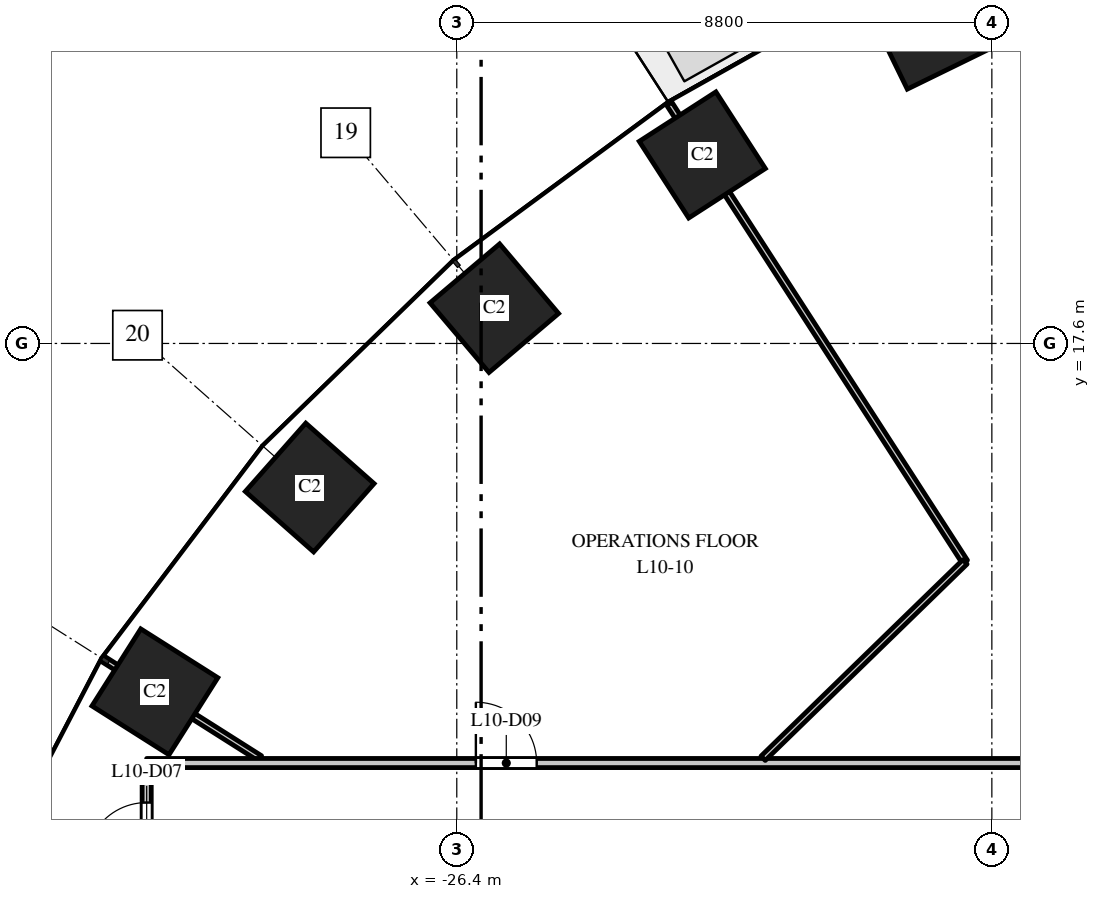
"""IFC4 building model, lengths in metres.
Left out: names, types, materials, properties, quantities, classifications, styles, units other than length and angle.
Written with IfcOpenShell. Run it as: python <this file> out.ifc"""

import sys

from ifc_helpers import new_model, si_unit, direction, frame, frame_2d, origin, origin_2d, place, context, subcontext, project, spatial, rectangle, extrude, element, fill, save


model = new_model("IFC4")
c1 = context("Model", 3, precision=1e-05, world=origin(), true_north=direction((0.0, 1.0)))
c2 = subcontext(c1, "Body", "Model", "MODEL_VIEW")
j1 = project(units=[si_unit("LENGTHUNIT", "METRE"), si_unit("PLANEANGLEUNIT", "RADIAN")], contexts=[c1])
p1 = place(None, origin())
s1 = spatial("IfcSite", under=j1, at=p1, CompositionType="ELEMENT")
p2 = place(p1, origin())
s2 = spatial("IfcBuilding", under=s1, at=p2, CompositionType="ELEMENT")
p3 = place(p2, frame((0.0, 0.0, 50.5)))
s3 = spatial("IfcBuildingStorey", under=s2, at=p3, CompositionType="ELEMENT", Elevation=50.5)
for number, where, z_axis, x_axis in (
    (1, (-18.646, 22.785, 0.0), (0.0, 0.0, 1.0), (-0.898, -0.439, 0.0)),
    (2, (-22.362, 20.7, 0.0), (0.0, 0.0, 1.0), (-0.84, -0.542, 0.0)),
    (3, (-25.783, 18.18, 0.0), (0.0, 0.0, 1.0), (-0.763, -0.646, 0.0)),
    (4, (-28.819, 15.23, 0.0), (0.0, 0.0, 1.0), (-0.663, -0.749, 0.0)),
    (5, (-31.365, 11.871, 0.0), (0.0, 0.0, 1.0), (-0.535, -0.845, 0.0)),
):
    element("IfcColumn", number, at=place(p3, frame(where, z_axis=z_axis, x_axis=x_axis)), inside=s3, PredefinedType="COLUMN", context=c2, shape_type="SweptSolid", body=[
        extrude(rectangle(XDim=1.5, YDim=1.5, at=origin_2d()), origin(), (0.0, 0.0, 1.0), 4.0),
    ])
p4 = place(p3, frame((-32.212, 12.408, 0.0), z_axis=(0.0, 0.0, 1.0), x_axis=(0.844810627195, -0.535065420467, 0.0)))
e6 = element("IfcWall", 6, at=p4, inside=s3, PredefinedType="PARTITIONING", context=c2, shape_type="SweptSolid", body=[
    extrude(rectangle(XDim=3.048, YDim=0.1, at=frame_2d((1.524, 0.0))), origin(), (0.0, 0.0, 1.0), 3.7),
])
p5 = place(p3, frame((-31.5, 8.5, 0.0), z_axis=(0.0, 0.0, 1.0), x_axis=(0.0, 1.0, 0.0)))
e7 = element("IfcWall", 7, at=p5, inside=s3, PredefinedType="PARTITIONING", context=c2, shape_type="SweptSolid", body=[
    extrude(rectangle(XDim=2.2, YDim=0.15, at=frame_2d((1.1, 0.0))), origin(), (0.0, 0.0, 1.0), 3.7),
])
p6 = place(p5, frame((0.55, 0.0, 0.0)))
e8 = element("IfcOpeningElement", 8, at=p6, cuts=e7, PredefinedType="OPENING", context=c2, shape_type="SweptSolid", body=[
    extrude(rectangle(XDim=1.0, YDim=2.1, at=frame_2d((0.5, 1.05))), frame((0.0, 0.085, 0.0), z_axis=(0.0, -1.0, 0.0), x_axis=(1.0, 0.0, 0.0)), (0.0, 0.0, 1.0), 0.17),
])
p7 = place(p3, frame((-31.5, 10.7, 0.0), z_axis=(0.0, 0.0, 1.0), x_axis=(1.0, 0.0, 0.0)))
e9 = element("IfcWall", 9, at=p7, inside=s3, PredefinedType="PARTITIONING", context=c2, shape_type="SweptSolid", body=[
    extrude(rectangle(XDim=15.0, YDim=0.15, at=frame_2d((7.5, 0.0))), origin(), (0.0, 0.0, 1.0), 3.1),
])
p8 = place(p7, frame((5.414, 0.0, 0.0)))
e10 = element("IfcOpeningElement", 10, at=p8, cuts=e9, PredefinedType="OPENING", context=c2, shape_type="SweptSolid", body=[
    extrude(rectangle(XDim=1.0, YDim=2.1, at=frame_2d((0.5, 1.05))), frame((0.0, 0.085, 0.0), z_axis=(0.0, -1.0, 0.0), x_axis=(1.0, 0.0, 0.0)), (0.0, 0.0, 1.0), 0.17),
])
p9 = place(p3, frame((-22.905, 21.542, 0.0), z_axis=(0.0, 0.0, 1.0), x_axis=(0.542241597628, -0.840222619192, 0.0)))
e11 = element("IfcWall", 11, at=p9, inside=s3, PredefinedType="PARTITIONING", context=c2, shape_type="SweptSolid", body=[
    extrude(rectangle(XDim=8.967, YDim=0.1, at=frame_2d((4.483, 0.0))), origin(), (0.0, 0.0, 1.0), 2.85),
])
p10 = place(p3, frame((-21.362, 10.778, 0.0), z_axis=(0.0, 0.0, 1.0), x_axis=(0.716869759063, 0.697207105917, 0.0)))
e12 = element("IfcWall", 12, at=p10, inside=s3, PredefinedType="PARTITIONING", context=c2, shape_type="SweptSolid", body=[
    extrude(rectangle(XDim=4.631, YDim=0.1, at=frame_2d((2.316, 0.0))), origin(), (0.0, 0.0, 1.0), 2.75),
])
p11 = place(p6, origin())
e13 = element("IfcDoor", 13, at=p11, inside=s3, OperationType="SINGLE_SWING_LEFT", PredefinedType="DOOR", context=c2, shape_type="SweptSolid", body=[
    extrude(rectangle(XDim=1.0, YDim=2.1, at=frame_2d((0.5, 1.05))), frame((0.0, 0.025, 0.0), z_axis=(0.0, -1.0, 0.0), x_axis=(1.0, 0.0, 0.0)), (0.0, 0.0, 1.0), 0.05),
])
fill(e8, e13)
p12 = place(p8, origin())
e14 = element("IfcDoor", 14, at=p12, inside=s3, OperationType="SINGLE_SWING_LEFT", PredefinedType="DOOR", context=c2, shape_type="SweptSolid", body=[
    extrude(rectangle(XDim=1.0, YDim=2.1, at=frame_2d((0.5, 1.05))), frame((0.0, 0.025, 0.0), z_axis=(0.0, -1.0, 0.0), x_axis=(1.0, 0.0, 0.0)), (0.0, 0.0, 1.0), 0.05),
])
fill(e10, e14)
save(model, sys.argv[1])
